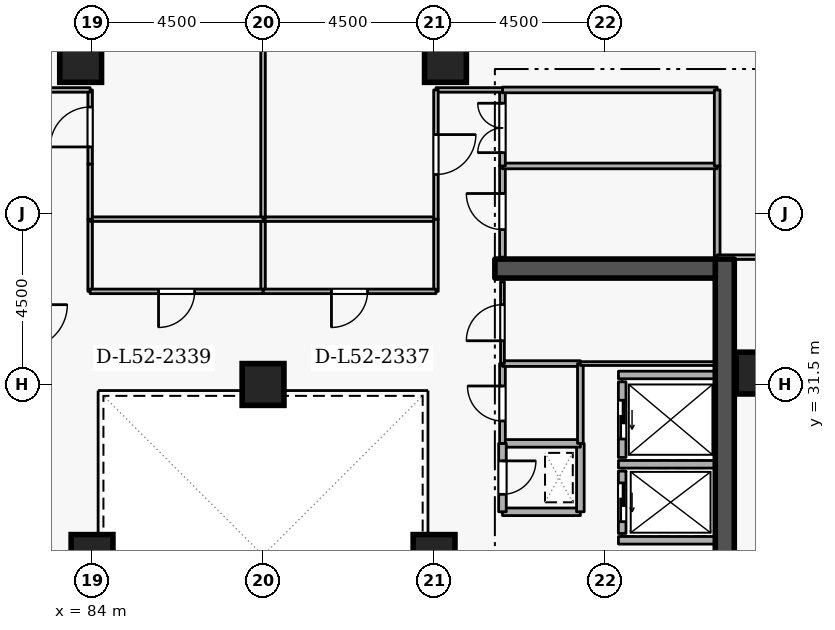
"""IFC4 building model, lengths in metres.
Left out: names, types, materials, properties, quantities, classifications, styles, units other than length and angle.
Written with IfcOpenShell. Run it as: python <this file> out.ifc"""

import sys

from ifc_helpers import new_model, si_unit, direction, frame, frame_2d, origin, origin_2d, place, context, subcontext, project, spatial, rectangle, extrude, element, fill, save


model = new_model("IFC4")
c1 = context("Model", 3, precision=1e-05, world=origin(), true_north=direction((0.0, 1.0)))
c2 = subcontext(c1, "Body", "Model", "MODEL_VIEW")
j1 = project(units=[si_unit("LENGTHUNIT", "METRE"), si_unit("PLANEANGLEUNIT", "RADIAN")], contexts=[c1])
p1 = place(None, origin())
s1 = spatial("IfcSite", under=j1, at=p1, CompositionType="ELEMENT")
p2 = place(p1, origin())
s2 = spatial("IfcBuilding", under=s1, at=p2, CompositionType="ELEMENT")
p3 = place(p2, frame((0.0, 0.0, 196.5)))
s3 = spatial("IfcBuildingStorey", under=s2, at=p3, CompositionType="ELEMENT", Elevation=196.5)
p4 = place(p3, frame((100.65, 19.2, 0.0), z_axis=(0.0, 0.0, 1.0), x_axis=(0.0, 1.0, 0.0)))
e1 = element("IfcWall", 1, at=p4, inside=s3, PredefinedType="SHEAR", context=c2, shape_type="SweptSolid", body=[
    extrude(rectangle(XDim=15.6, YDim=0.5, at=frame_2d((7.8, 0.0))), origin(), (0.0, 0.0, 1.0), 3.6),
])
p5 = place(p3, frame((94.6, 34.55, 0.0), z_axis=(0.0, 0.0, 1.0), x_axis=(1.0, 0.0, 0.0)))
e2 = element("IfcWall", 2, at=p5, inside=s3, PredefinedType="SHEAR", context=c2, shape_type="SweptSolid", body=[
    extrude(rectangle(XDim=5.8, YDim=0.5, at=frame_2d((2.9, 0.0))), origin(), (0.0, 0.0, 1.0), 3.6),
])
for number, where, z_axis, x_axis in (
    (3, (93.3, 40.0, 0.0), (0.0, 0.0, 1.0), (1.0, 0.0, 0.0)),
    (4, (83.7, 40.0, 0.0), (0.0, 0.0, 1.0), (1.0, 0.0, 0.0)),
    (5, (101.5, 31.8, 0.0), (0.0, 0.0, 1.0), (1.0, 0.0, 0.0)),
    (6, (93.0, 27.0, 0.0), (0.0, 0.0, 1.0), (1.0, 0.0, 0.0)),
    (7, (84.0, 27.0, 0.0), (0.0, 0.0, 1.0), (1.0, 0.0, 0.0)),
    (8, (88.5, 31.5, 0.0), (0.0, 0.0, 1.0), (1.0, 0.0, 0.0)),
):
    element("IfcColumn", number, at=place(p3, frame(where, z_axis=z_axis, x_axis=x_axis)), inside=s3, PredefinedType="COLUMN", context=c2, shape_type="SweptSolid", body=[
        extrude(rectangle(XDim=1.1, YDim=1.1, at=origin_2d()), origin(), (0.0, 0.0, 1.0), 3.6),
    ])
p6 = place(p3, frame((97.95, 29.22, 0.0), z_axis=(0.0, 0.0, 1.0), x_axis=(0.0, -1.0, 0.0)))
e9 = element("IfcWall", 9, at=p6, inside=s3, PredefinedType="STANDARD", context=c2, shape_type="SweptSolid", body=[
    extrude(rectangle(XDim=1.64, YDim=0.2, at=frame_2d((0.82, 0.0))), origin(), (0.0, 0.0, 1.0), 3.32),
])
p7 = place(p6, frame((0.31, 0.0, 0.0)))
e10 = element("IfcOpeningElement", 10, at=p7, cuts=e9, PredefinedType="OPENING", context=c2, shape_type="SweptSolid", body=[
    extrude(rectangle(XDim=1.02, YDim=2.06, at=frame_2d((0.51, 1.03))), frame((0.0, 0.11, 0.0), z_axis=(0.0, -1.0, 0.0), x_axis=(1.0, 0.0, 0.0)), (0.0, 0.0, 1.0), 0.22),
])
p8 = place(p3, frame((97.95, 31.57, 0.0), z_axis=(0.0, 0.0, 1.0), x_axis=(0.0, -1.0, 0.0)))
e11 = element("IfcWall", 11, at=p8, inside=s3, PredefinedType="STANDARD", context=c2, shape_type="SweptSolid", body=[
    extrude(rectangle(XDim=1.99, YDim=0.2, at=frame_2d((0.995, 0.0))), origin(), (0.0, 0.0, 1.0), 3.32),
])
p9 = place(p8, frame((0.485, 0.0, 0.0)))
e12 = element("IfcOpeningElement", 12, at=p9, cuts=e11, PredefinedType="OPENING", context=c2, shape_type="SweptSolid", body=[
    extrude(rectangle(XDim=1.02, YDim=2.06, at=frame_2d((0.51, 1.03))), frame((0.0, 0.11, 0.0), z_axis=(0.0, -1.0, 0.0), x_axis=(1.0, 0.0, 0.0)), (0.0, 0.0, 1.0), 0.22),
])
for number, where, z_axis, x_axis in (
    (13, (97.852, 29.4, 0.0), (0.0, 0.0, 1.0), (1.0, 0.0, 0.0)),
    (14, (97.852, 27.4, 0.0), (0.0, 0.0, 1.0), (1.0, 0.0, 0.0)),
    (15, (97.852, 31.75, 0.0), (0.0, 0.0, 1.0), (1.0, 0.0, 0.0)),
):
    element("IfcWall", number, at=place(p3, frame(where, z_axis=z_axis, x_axis=x_axis)), inside=s3, PredefinedType="STANDARD", context=c2, shape_type="SweptSolid", body=[
        extrude(rectangle(XDim=2.536, YDim=0.2, at=frame_2d((1.268, 0.0))), origin(), (0.0, 0.0, 1.0), 3.32),
    ])
p10 = place(p3, frame((94.8, 28.15, 0.0), z_axis=(0.0, 0.0, 1.0), x_axis=(1.0, 0.0, 0.0)))
e16 = element("IfcWall", 16, at=p10, inside=s3, PredefinedType="STANDARD", context=c2, shape_type="SweptSolid", body=[
    extrude(rectangle(XDim=2.05, YDim=0.2, at=frame_2d((1.025, 0.0))), origin(), (0.0, 0.0, 1.0), 3.32),
])
p11 = place(p3, frame((96.85, 28.15, 0.0), z_axis=(0.0, 0.0, 1.0), x_axis=(0.0, 1.0, 0.0)))
e17 = element("IfcWall", 17, at=p11, inside=s3, PredefinedType="STANDARD", context=c2, shape_type="SweptSolid", body=[
    extrude(rectangle(XDim=1.8, YDim=0.2, at=frame_2d((0.9, 0.0))), origin(), (0.0, 0.0, 1.0), 3.32),
])
p12 = place(p3, frame((96.85, 29.95, 0.0), z_axis=(0.0, 0.0, 1.0), x_axis=(-1.0, 0.0, 0.0)))
e18 = element("IfcWall", 18, at=p12, inside=s3, PredefinedType="STANDARD", context=c2, shape_type="SweptSolid", body=[
    extrude(rectangle(XDim=2.05, YDim=0.2, at=frame_2d((1.025, 0.0))), origin(), (0.0, 0.0, 1.0), 3.32),
])
p13 = place(p3, frame((94.8, 29.95, 0.0), z_axis=(0.0, 0.0, 1.0), x_axis=(0.0, -1.0, 0.0)))
e19 = element("IfcWall", 19, at=p13, inside=s3, PredefinedType="STANDARD", context=c2, shape_type="SweptSolid", body=[
    extrude(rectangle(XDim=1.8, YDim=0.2, at=frame_2d((0.9, 0.0))), origin(), (0.0, 0.0, 1.0), 3.32),
])
p14 = place(p13, frame((0.46, 0.0, 0.0)))
e20 = element("IfcOpeningElement", 20, at=p14, cuts=e19, PredefinedType="OPENING", context=c2, shape_type="SweptSolid", body=[
    extrude(rectangle(XDim=0.88, YDim=2.04, at=frame_2d((0.44, 1.02))), frame((0.0, 0.11, 0.0), z_axis=(0.0, -1.0, 0.0), x_axis=(1.0, 0.0, 0.0)), (0.0, 0.0, 1.0), 0.22),
])
p15 = place(p3, frame((94.8, 29.95, 0.0), z_axis=(0.0, 0.0, 1.0), x_axis=(0.0, 1.0, 0.0)))
e21 = element("IfcWall", 21, at=p15, inside=s3, PredefinedType="PARTITIONING", context=c2, shape_type="SweptSolid", body=[
    extrude(rectangle(XDim=2.1, YDim=0.15, at=frame_2d((1.05, 0.0))), origin(), (0.0, 0.0, 1.0), 3.32),
])
p16 = place(p15, frame((0.59, 0.0, 0.0)))
e22 = element("IfcOpeningElement", 22, at=p16, cuts=e21, PredefinedType="OPENING", context=c2, shape_type="SweptSolid", body=[
    extrude(rectangle(XDim=0.92, YDim=2.08, at=frame_2d((0.46, 1.04))), frame((0.0, 0.085, 0.0), z_axis=(0.0, -1.0, 0.0), x_axis=(1.0, 0.0, 0.0)), (0.0, 0.0, 1.0), 0.17),
])
p17 = place(p3, frame((94.8, 32.05, 0.0), z_axis=(0.0, 0.0, 1.0), x_axis=(1.0, 0.0, 0.0)))
e23 = element("IfcWall", 23, at=p17, inside=s3, PredefinedType="PARTITIONING", context=c2, shape_type="SweptSolid", body=[
    extrude(rectangle(XDim=2.05, YDim=0.15, at=frame_2d((1.025, 0.0))), origin(), (0.0, 0.0, 1.0), 3.32),
])
p18 = place(p3, frame((96.85, 32.05, 0.0), z_axis=(0.0, 0.0, 1.0), x_axis=(0.0, -1.0, 0.0)))
e24 = element("IfcWall", 24, at=p18, inside=s3, PredefinedType="PARTITIONING", context=c2, shape_type="SweptSolid", body=[
    extrude(rectangle(XDim=2.1, YDim=0.15, at=frame_2d((1.05, 0.0))), origin(), (0.0, 0.0, 1.0), 3.32),
])
p19 = place(p3, frame((94.8, 32.05, 0.0), z_axis=(0.0, 0.0, 1.0), x_axis=(0.0, 1.0, 0.0)))
e25 = element("IfcWall", 25, at=p19, inside=s3, PredefinedType="PARTITIONING", context=c2, shape_type="SweptSolid", body=[
    extrude(rectangle(XDim=2.15, YDim=0.1, at=frame_2d((1.075, 0.0))), origin(), (0.0, 0.0, 1.0), 3.32),
])
p20 = place(p19, frame((0.6, 0.0, 0.0)))
e26 = element("IfcOpeningElement", 26, at=p20, cuts=e25, PredefinedType="OPENING", context=c2, shape_type="SweptSolid", body=[
    extrude(rectangle(XDim=0.95, YDim=2.1, at=frame_2d((0.475, 1.05))), frame((0.0, 0.06, 0.0), z_axis=(0.0, -1.0, 0.0), x_axis=(1.0, 0.0, 0.0)), (0.0, 0.0, 1.0), 0.12),
])
p21 = place(p3, frame((100.4, 32.05, 0.0), z_axis=(0.0, 0.0, 1.0), x_axis=(-1.0, 0.0, 0.0)))
e27 = element("IfcWall", 27, at=p21, inside=s3, PredefinedType="PARTITIONING", context=c2, shape_type="SweptSolid", body=[
    extrude(rectangle(XDim=3.55, YDim=0.1, at=frame_2d((1.775, 0.0))), origin(), (0.0, 0.0, 1.0), 3.32),
])
p22 = place(p3, frame((100.45, 37.25, 0.0), z_axis=(0.0, 0.0, 1.0), x_axis=(0.0, -1.0, 0.0)))
e28 = element("IfcWall", 28, at=p22, inside=s3, PredefinedType="PARTITIONING", context=c2, shape_type="SweptSolid", body=[
    extrude(rectangle(XDim=2.4, YDim=0.15, at=frame_2d((1.2, 0.0))), origin(), (0.0, 0.0, 1.0), 3.32),
])
p23 = place(p3, frame((94.8, 34.85, 0.0), z_axis=(0.0, 0.0, 1.0), x_axis=(0.0, 1.0, 0.0)))
e29 = element("IfcWall", 29, at=p23, inside=s3, PredefinedType="PARTITIONING", context=c2, shape_type="SweptSolid", body=[
    extrude(rectangle(XDim=2.4, YDim=0.15, at=frame_2d((1.2, 0.0))), origin(), (0.0, 0.0, 1.0), 3.32),
])
p24 = place(p23, frame((0.725, 0.0, 0.0)))
e30 = element("IfcOpeningElement", 30, at=p24, cuts=e29, PredefinedType="OPENING", context=c2, shape_type="SweptSolid", body=[
    extrude(rectangle(XDim=0.95, YDim=2.1, at=frame_2d((0.475, 1.05))), frame((0.0, 0.085, 0.0), z_axis=(0.0, -1.0, 0.0), x_axis=(1.0, 0.0, 0.0)), (0.0, 0.0, 1.0), 0.17),
])
p25 = place(p3, frame((94.8, 37.25, 0.0), z_axis=(0.0, 0.0, 1.0), x_axis=(1.0, 0.0, 0.0)))
e31 = element("IfcWall", 31, at=p25, inside=s3, PredefinedType="PARTITIONING", context=c2, shape_type="SweptSolid", body=[
    extrude(rectangle(XDim=5.65, YDim=0.15, at=frame_2d((2.825, 0.0))), origin(), (0.0, 0.0, 1.0), 3.32),
])
p26 = place(p3, frame((94.8, 37.25, 0.0), z_axis=(0.0, 0.0, 1.0), x_axis=(0.0, 1.0, 0.0)))
e32 = element("IfcWall", 32, at=p26, inside=s3, PredefinedType="PARTITIONING", context=c2, shape_type="SweptSolid", body=[
    extrude(rectangle(XDim=2.0, YDim=0.15, at=frame_2d((1.0, 0.0))), origin(), (0.0, 0.0, 1.0), 3.32),
])
p27 = place(p26, frame((0.35, 0.0, 0.0)))
e33 = element("IfcOpeningElement", 33, at=p27, cuts=e32, PredefinedType="OPENING", context=c2, shape_type="SweptSolid", body=[
    extrude(rectangle(XDim=1.3, YDim=2.12, at=frame_2d((0.65, 1.06))), frame((0.0, 0.085, 0.0), z_axis=(0.0, -1.0, 0.0), x_axis=(1.0, 0.0, 0.0)), (0.0, 0.0, 1.0), 0.17),
])
p28 = place(p3, frame((94.8, 39.25, 0.0), z_axis=(0.0, 0.0, 1.0), x_axis=(1.0, 0.0, 0.0)))
e34 = element("IfcWall", 34, at=p28, inside=s3, PredefinedType="PARTITIONING", context=c2, shape_type="SweptSolid", body=[
    extrude(rectangle(XDim=5.65, YDim=0.15, at=frame_2d((2.825, 0.0))), origin(), (0.0, 0.0, 1.0), 3.32),
])
p29 = place(p3, frame((100.45, 39.25, 0.0), z_axis=(0.0, 0.0, 1.0), x_axis=(0.0, -1.0, 0.0)))
e35 = element("IfcWall", 35, at=p29, inside=s3, PredefinedType="PARTITIONING", context=c2, shape_type="SweptSolid", body=[
    extrude(rectangle(XDim=2.0, YDim=0.15, at=frame_2d((1.0, 0.0))), origin(), (0.0, 0.0, 1.0), 3.32),
])
p30 = place(p3, frame((88.5, 33.95, 0.0), z_axis=(0.0, 0.0, 1.0), x_axis=(0.0, 1.0, 0.0)))
e36 = element("IfcWall", 36, at=p30, inside=s3, PredefinedType="PARTITIONING", context=c2, shape_type="SweptSolid", body=[
    extrude(rectangle(XDim=1.9, YDim=0.12, at=frame_2d((0.95, 0.0))), origin(), (0.0, 0.0, 1.0), 3.32),
])
p31 = place(p3, frame((88.5, 35.85, 0.0), z_axis=(0.0, 0.0, 1.0), x_axis=(1.0, 0.0, 0.0)))
e37 = element("IfcWall", 37, at=p31, inside=s3, PredefinedType="PARTITIONING", context=c2, shape_type="SweptSolid", body=[
    extrude(rectangle(XDim=4.55, YDim=0.12, at=frame_2d((2.275, 0.0))), origin(), (0.0, 0.0, 1.0), 3.32),
])
p32 = place(p3, frame((93.05, 35.85, 0.0), z_axis=(0.0, 0.0, 1.0), x_axis=(0.0, -1.0, 0.0)))
e38 = element("IfcWall", 38, at=p32, inside=s3, PredefinedType="PARTITIONING", context=c2, shape_type="SweptSolid", body=[
    extrude(rectangle(XDim=1.9, YDim=0.12, at=frame_2d((0.95, 0.0))), origin(), (0.0, 0.0, 1.0), 3.32),
])
p33 = place(p3, frame((93.05, 33.95, 0.0), z_axis=(0.0, 0.0, 1.0), x_axis=(-1.0, 0.0, 0.0)))
e39 = element("IfcWall", 39, at=p33, inside=s3, PredefinedType="PARTITIONING", context=c2, shape_type="SweptSolid", body=[
    extrude(rectangle(XDim=4.55, YDim=0.12, at=frame_2d((2.275, 0.0))), origin(), (0.0, 0.0, 1.0), 3.32),
])
p34 = place(p33, frame((1.8, 0.0, 0.0)))
e40 = element("IfcOpeningElement", 40, at=p34, cuts=e39, PredefinedType="OPENING", context=c2, shape_type="SweptSolid", body=[
    extrude(rectangle(XDim=0.95, YDim=2.1, at=frame_2d((0.475, 1.05))), frame((0.0, 0.07, 0.0), z_axis=(0.0, -1.0, 0.0), x_axis=(1.0, 0.0, 0.0)), (0.0, 0.0, 1.0), 0.14),
])
p35 = place(p3, frame((94.8, 39.25, 0.0), z_axis=(0.0, 0.0, 1.0), x_axis=(-1.0, 0.0, 0.0)))
e41 = element("IfcWall", 41, at=p35, inside=s3, PredefinedType="PARTITIONING", context=c2, shape_type="SweptSolid", body=[
    extrude(rectangle(XDim=1.75, YDim=0.12, at=frame_2d((0.875, 0.0))), origin(), (0.0, 0.0, 1.0), 3.32),
])
p36 = place(p3, frame((93.05, 39.25, 0.0), z_axis=(0.0, 0.0, 1.0), x_axis=(0.0, -1.0, 0.0)))
e42 = element("IfcWall", 42, at=p36, inside=s3, PredefinedType="PARTITIONING", context=c2, shape_type="SweptSolid", body=[
    extrude(rectangle(XDim=3.4, YDim=0.12, at=frame_2d((1.7, 0.0))), origin(), (0.0, 0.0, 1.0), 3.32),
])
p37 = place(p36, frame((1.175, 0.0, 0.0)))
e43 = element("IfcOpeningElement", 43, at=p37, cuts=e42, PredefinedType="OPENING", context=c2, shape_type="SweptSolid", body=[
    extrude(rectangle(XDim=1.05, YDim=2.1, at=frame_2d((0.525, 1.05))), frame((0.0, 0.07, 0.0), z_axis=(0.0, -1.0, 0.0), x_axis=(1.0, 0.0, 0.0)), (0.0, 0.0, 1.0), 0.14),
])
p38 = place(p3, frame((88.5, 35.85, 0.0), z_axis=(0.0, 0.0, 1.0), x_axis=(0.0, 1.0, 0.0)))
e44 = element("IfcWall", 44, at=p38, inside=s3, PredefinedType="PARTITIONING", context=c2, shape_type="SweptSolid", body=[
    extrude(rectangle(XDim=14.87, YDim=0.12, at=frame_2d((7.435, 0.0))), origin(), (0.0, 0.0, 1.0), 2.862),
])
p39 = place(p3, frame((106.22, 34.85, 0.0), z_axis=(0.0, 0.0, 1.0), x_axis=(-1.0, 0.0, 0.0)))
e45 = element("IfcWall", 45, at=p39, inside=s3, PredefinedType="PARTITIONING", context=c2, shape_type="SweptSolid", body=[
    extrude(rectangle(XDim=5.77, YDim=0.12, at=frame_2d((2.885, 0.0))), origin(), (0.0, 0.0, 1.0), 2.525),
])
p40 = place(p3, frame((83.95, 33.95, 0.0), z_axis=(0.0, 0.0, 1.0), x_axis=(0.0, 1.0, 0.0)))
e46 = element("IfcWall", 46, at=p40, inside=s3, PredefinedType="PARTITIONING", context=c2, shape_type="SweptSolid", body=[
    extrude(rectangle(XDim=1.9, YDim=0.12, at=frame_2d((0.95, 0.0))), origin(), (0.0, 0.0, 1.0), 3.32),
])
p41 = place(p3, frame((83.95, 35.85, 0.0), z_axis=(0.0, 0.0, 1.0), x_axis=(1.0, 0.0, 0.0)))
e47 = element("IfcWall", 47, at=p41, inside=s3, PredefinedType="PARTITIONING", context=c2, shape_type="SweptSolid", body=[
    extrude(rectangle(XDim=4.55, YDim=0.12, at=frame_2d((2.275, 0.0))), origin(), (0.0, 0.0, 1.0), 3.32),
])
p42 = place(p3, frame((88.5, 33.95, 0.0), z_axis=(0.0, 0.0, 1.0), x_axis=(-1.0, 0.0, 0.0)))
e48 = element("IfcWall", 48, at=p42, inside=s3, PredefinedType="PARTITIONING", context=c2, shape_type="SweptSolid", body=[
    extrude(rectangle(XDim=4.55, YDim=0.12, at=frame_2d((2.275, 0.0))), origin(), (0.0, 0.0, 1.0), 3.32),
])
p43 = place(p42, frame((1.8, 0.0, 0.0)))
e49 = element("IfcOpeningElement", 49, at=p43, cuts=e48, PredefinedType="OPENING", context=c2, shape_type="SweptSolid", body=[
    extrude(rectangle(XDim=0.95, YDim=2.1, at=frame_2d((0.475, 1.05))), frame((0.0, 0.07, 0.0), z_axis=(0.0, -1.0, 0.0), x_axis=(1.0, 0.0, 0.0)), (0.0, 0.0, 1.0), 0.14),
])
p44 = place(p3, frame((83.95, 35.85, 0.0), z_axis=(0.0, 0.0, 1.0), x_axis=(0.0, 1.0, 0.0)))
e50 = element("IfcWall", 50, at=p44, inside=s3, PredefinedType="PARTITIONING", context=c2, shape_type="SweptSolid", body=[
    extrude(rectangle(XDim=1.45, YDim=0.12, at=frame_2d((0.725, 0.0))), origin(), (0.0, 0.0, 1.0), 3.32),
])
p45 = place(p3, frame((83.95, 37.3, 0.0), z_axis=(0.0, 0.0, 1.0), x_axis=(0.0, 1.0, 0.0)))
e51 = element("IfcWall", 51, at=p45, inside=s3, PredefinedType="PARTITIONING", context=c2, shape_type="SweptSolid", body=[
    extrude(rectangle(XDim=1.95, YDim=0.12, at=frame_2d((0.975, 0.0))), origin(), (0.0, 0.0, 1.0), 3.32),
])
p46 = place(p45, frame((0.45, 0.0, 0.0)))
e52 = element("IfcOpeningElement", 52, at=p46, cuts=e51, PredefinedType="OPENING", context=c2, shape_type="SweptSolid", body=[
    extrude(rectangle(XDim=1.05, YDim=2.1, at=frame_2d((0.525, 1.05))), frame((0.0, 0.07, 0.0), z_axis=(0.0, -1.0, 0.0), x_axis=(1.0, 0.0, 0.0)), (0.0, 0.0, 1.0), 0.14),
])
p47 = place(p3, frame((83.95, 39.25, 0.0), z_axis=(0.0, 0.0, 1.0), x_axis=(-1.0, 0.0, 0.0)))
e53 = element("IfcWall", 53, at=p47, inside=s3, PredefinedType="PARTITIONING", context=c2, shape_type="SweptSolid", body=[
    extrude(rectangle(XDim=1.75, YDim=0.12, at=frame_2d((0.875, 0.0))), origin(), (0.0, 0.0, 1.0), 3.32),
])
p48 = place(p7, origin())
e54 = element("IfcDoor", 54, at=p48, inside=s3, OperationType="SLIDING_TO_LEFT", PredefinedType="DOOR", context=c2, shape_type="SweptSolid", body=[
    extrude(rectangle(XDim=1.02, YDim=2.06, at=frame_2d((0.51, 1.03))), frame((0.0, 0.025, 0.0), z_axis=(0.0, -1.0, 0.0), x_axis=(1.0, 0.0, 0.0)), (0.0, 0.0, 1.0), 0.05),
])
fill(e10, e54)
p49 = place(p9, origin())
e55 = element("IfcDoor", 55, at=p49, inside=s3, OperationType="SLIDING_TO_LEFT", PredefinedType="DOOR", context=c2, shape_type="SweptSolid", body=[
    extrude(rectangle(XDim=1.02, YDim=2.06, at=frame_2d((0.51, 1.03))), frame((0.0, 0.025, 0.0), z_axis=(0.0, -1.0, 0.0), x_axis=(1.0, 0.0, 0.0)), (0.0, 0.0, 1.0), 0.05),
])
fill(e12, e55)
p50 = place(p14, origin())
e56 = element("IfcDoor", 56, at=p50, inside=s3, OperationType="SINGLE_SWING_LEFT", PredefinedType="DOOR", context=c2, shape_type="SweptSolid", body=[
    extrude(rectangle(XDim=0.88, YDim=2.04, at=frame_2d((0.44, 1.02))), frame((0.0, 0.025, 0.0), z_axis=(0.0, -1.0, 0.0), x_axis=(1.0, 0.0, 0.0)), (0.0, 0.0, 1.0), 0.05),
])
fill(e20, e56)
p51 = place(p16, origin())
e57 = element("IfcDoor", 57, at=p51, inside=s3, OperationType="SINGLE_SWING_RIGHT", PredefinedType="DOOR", context=c2, shape_type="SweptSolid", body=[
    extrude(rectangle(XDim=0.92, YDim=2.08, at=frame_2d((0.46, 1.04))), frame((0.0, 0.025, 0.0), z_axis=(0.0, -1.0, 0.0), x_axis=(1.0, 0.0, 0.0)), (0.0, 0.0, 1.0), 0.05),
])
fill(e22, e57)
p52 = place(p20, origin())
e58 = element("IfcDoor", 58, at=p52, inside=s3, OperationType="SINGLE_SWING_LEFT", PredefinedType="DOOR", context=c2, shape_type="SweptSolid", body=[
    extrude(rectangle(XDim=0.95, YDim=2.1, at=frame_2d((0.475, 1.05))), frame((0.0, 0.025, 0.0), z_axis=(0.0, -1.0, 0.0), x_axis=(1.0, 0.0, 0.0)), (0.0, 0.0, 1.0), 0.05),
])
fill(e26, e58)
p53 = place(p24, origin())
e59 = element("IfcDoor", 59, at=p53, inside=s3, OperationType="SINGLE_SWING_RIGHT", PredefinedType="DOOR", context=c2, shape_type="SweptSolid", body=[
    extrude(rectangle(XDim=0.95, YDim=2.1, at=frame_2d((0.475, 1.05))), frame((0.0, 0.025, 0.0), z_axis=(0.0, -1.0, 0.0), x_axis=(1.0, 0.0, 0.0)), (0.0, 0.0, 1.0), 0.05),
])
fill(e30, e59)
p54 = place(p27, origin())
e60 = element("IfcDoor", 60, at=p54, inside=s3, OperationType="DOUBLE_DOOR_SINGLE_SWING", PredefinedType="DOOR", context=c2, shape_type="SweptSolid", body=[
    extrude(rectangle(XDim=1.3, YDim=2.12, at=frame_2d((0.65, 1.06))), frame((0.0, 0.025, 0.0), z_axis=(0.0, -1.0, 0.0), x_axis=(1.0, 0.0, 0.0)), (0.0, 0.0, 1.0), 0.05),
])
fill(e33, e60)
p55 = place(p34, origin())
e61 = element("IfcDoor", 61, at=p55, inside=s3, OperationType="SINGLE_SWING_RIGHT", PredefinedType="DOOR", context=c2, shape_type="SweptSolid", body=[
    extrude(rectangle(XDim=0.95, YDim=2.1, at=frame_2d((0.475, 1.05))), frame((0.0, 0.025, 0.0), z_axis=(0.0, -1.0, 0.0), x_axis=(1.0, 0.0, 0.0)), (0.0, 0.0, 1.0), 0.05),
])
fill(e40, e61)
p56 = place(p37, origin())
e62 = element("IfcDoor", 62, at=p56, inside=s3, OperationType="SINGLE_SWING_LEFT", PredefinedType="DOOR", context=c2, shape_type="SweptSolid", body=[
    extrude(rectangle(XDim=1.05, YDim=2.1, at=frame_2d((0.525, 1.05))), frame((0.0, 0.025, 0.0), z_axis=(0.0, -1.0, 0.0), x_axis=(1.0, 0.0, 0.0)), (0.0, 0.0, 1.0), 0.05),
])
fill(e43, e62)
p57 = place(p43, origin())
e63 = element("IfcDoor", 63, at=p57, inside=s3, OperationType="SINGLE_SWING_RIGHT", PredefinedType="DOOR", context=c2, shape_type="SweptSolid", body=[
    extrude(rectangle(XDim=0.95, YDim=2.1, at=frame_2d((0.475, 1.05))), frame((0.0, 0.025, 0.0), z_axis=(0.0, -1.0, 0.0), x_axis=(1.0, 0.0, 0.0)), (0.0, 0.0, 1.0), 0.05),
])
fill(e49, e63)
p58 = place(p46, origin())
e64 = element("IfcDoor", 64, at=p58, inside=s3, OperationType="SINGLE_SWING_LEFT", PredefinedType="DOOR", context=c2, shape_type="SweptSolid", body=[
    extrude(rectangle(XDim=1.05, YDim=2.1, at=frame_2d((0.525, 1.05))), frame((0.0, 0.025, 0.0), z_axis=(0.0, -1.0, 0.0), x_axis=(1.0, 0.0, 0.0)), (0.0, 0.0, 1.0), 0.05),
])
fill(e52, e64)
save(model, sys.argv[1])
